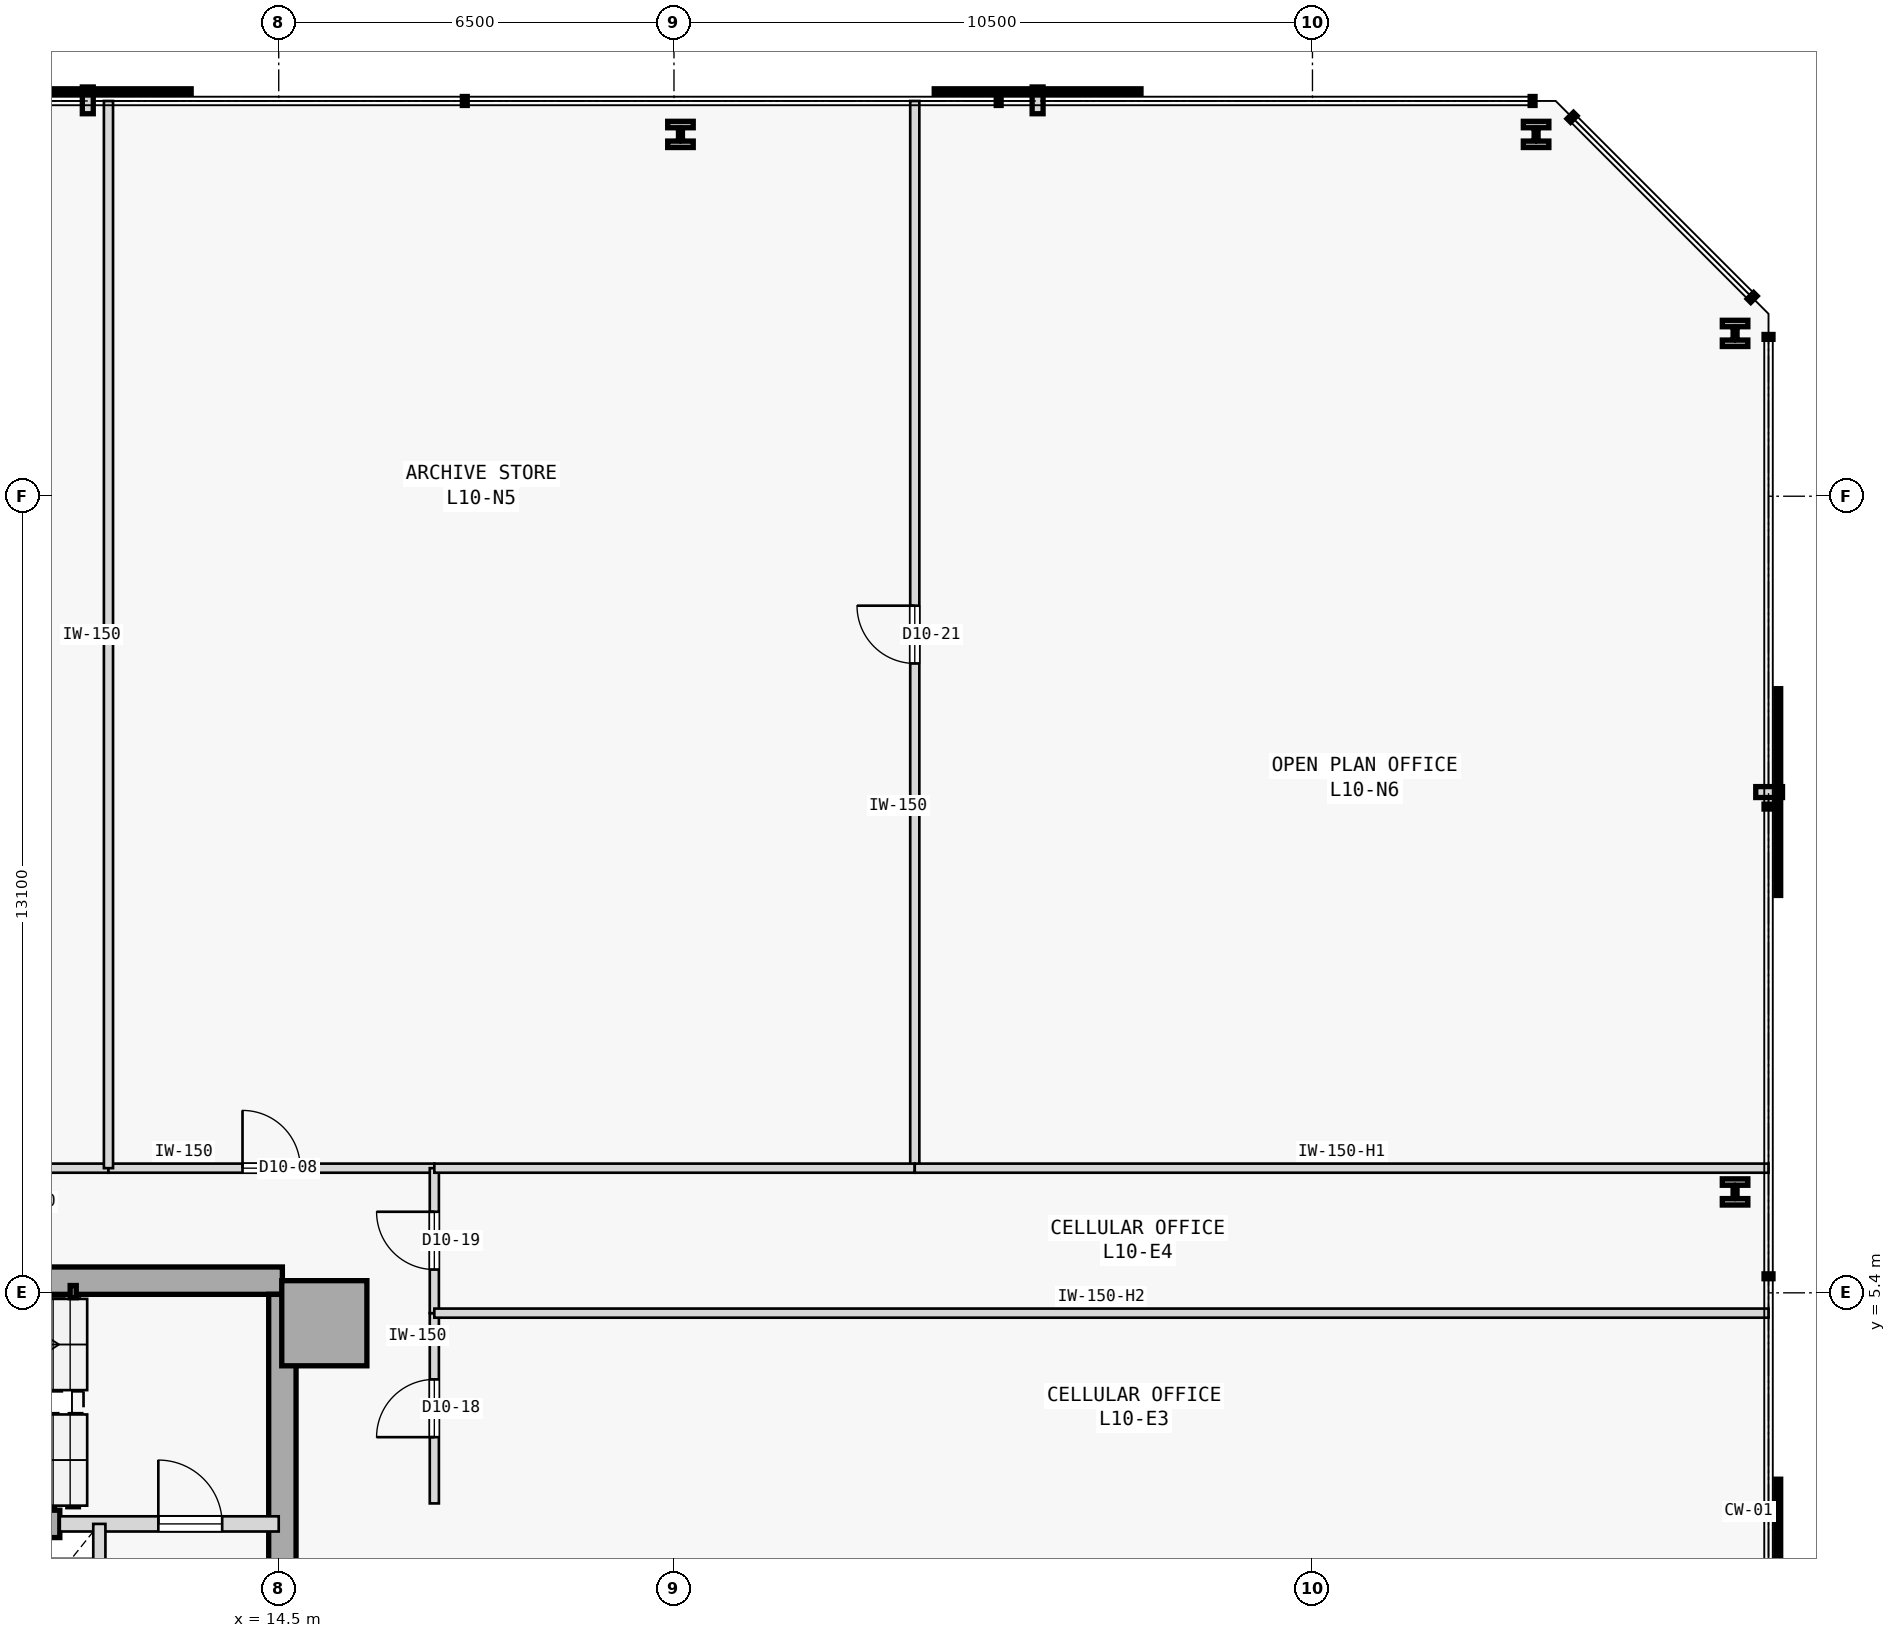
"""IFC4 building model, lengths in metres.
Left out: names, types, materials, properties, quantities, classifications, styles, units other than length and angle.
Written with IfcOpenShell. Run it as: python <this file> out.ifc"""

import sys

from ifc_helpers import new_model, si_unit, direction, frame, frame_2d, origin, origin_2d, place, context, subcontext, project, spatial, rectangle, hollow_rectangle, i_section, extrude, element, fill, save


model = new_model("IFC4")
c1 = context("Model", 3, precision=1e-05, world=origin(), true_north=direction((0.0, 1.0)))
c2 = subcontext(c1, "Body", "Model", "MODEL_VIEW")
j1 = project(units=[si_unit("LENGTHUNIT", "METRE"), si_unit("PLANEANGLEUNIT", "RADIAN")], contexts=[c1])
p1 = place(None, origin())
s1 = spatial("IfcSite", under=j1, at=p1, CompositionType="ELEMENT")
p2 = place(p1, origin())
s2 = spatial("IfcBuilding", under=s1, at=p2, CompositionType="ELEMENT")
p3 = place(p2, frame((0.0, 0.0, 44.6)))
s3 = spatial("IfcBuildingStorey", under=s2, at=p3, CompositionType="ELEMENT", Elevation=44.6)
p4 = place(p3, frame((15.25, 4.9, 0.0), z_axis=(0.0, 0.0, 1.0), x_axis=(1.0, 0.0, 0.0)))
e1 = element("IfcColumn", 1, at=p4, inside=s3, PredefinedType="COLUMN", context=c2, shape_type="SweptSolid", body=[
    extrude(rectangle(XDim=1.4, YDim=1.4, at=origin_2d()), origin(), (0.0, 0.0, 1.0), 3.8),
])
p5 = place(p3, frame((3.15, 5.6, 0.0), z_axis=(0.0, 0.0, 1.0), x_axis=(1.0, 0.0, 0.0)))
e2 = element("IfcWall", 2, at=p5, inside=s3, PredefinedType="SHEAR", context=c2, shape_type="SweptSolid", body=[
    extrude(rectangle(XDim=11.41, YDim=0.45, at=frame_2d((5.705, 0.0))), origin(), (0.0, 0.0, 1.0), 3.575),
])
p6 = place(p3, frame((14.56, -5.375, 0.0), z_axis=(0.0, 0.0, 1.0), x_axis=(0.0, 1.0, 0.0)))
e3 = element("IfcWall", 3, at=p6, inside=s3, PredefinedType="SHEAR", context=c2, shape_type="SweptSolid", body=[
    extrude(rectangle(XDim=10.75, YDim=0.45, at=frame_2d((5.375, 0.0))), origin(), (0.0, 0.0, 1.0), 3.575),
])
p7 = place(p3, frame((5.75, 1.6, 0.0), z_axis=(0.0, 0.0, 1.0), x_axis=(1.0, 0.0, 0.0)))
e4 = element("IfcWall", 4, at=p7, inside=s3, PredefinedType="SHEAR", context=c2, shape_type="SweptSolid", body=[
    extrude(rectangle(XDim=5.15, YDim=0.45, at=frame_2d((2.575, 0.0))), origin(), (0.0, 0.0, 1.0), 3.575),
])
p8 = place(p3, frame((11.12, 5.42, 0.0), z_axis=(0.0, 0.0, 1.0), x_axis=(1.0, 0.0, 0.0)))
e5 = element("IfcColumn", 5, at=p8, inside=s3, PredefinedType="COLUMN", context=c2, shape_type="SweptSolid", body=[
    extrude(hollow_rectangle(XDim=0.1, YDim=0.2, WallThickness=0.008, at=origin_2d()), origin(), (0.0, 0.0, 1.0), 3.8),
])
for number, where, z_axis, x_axis in (
    (6, (38.45, 7.059, 0.0), (0.0, 0.0, 1.0), (1.0, 0.0, 0.0)),
    (7, (38.45, 21.178, 0.0), (0.0, 0.0, 1.0), (1.0, 0.0, 0.0)),
    (8, (35.178, 24.45, 0.0), (0.0, 0.0, 1.0), (1.0, 0.0, 0.0)),
    (9, (21.107, 24.45, 0.0), (0.0, 0.0, 1.0), (1.0, 0.0, 0.0)),
):
    element("IfcColumn", number, at=place(p3, frame(where, z_axis=z_axis, x_axis=x_axis)), inside=s3, PredefinedType="COLUMN", context=c2, shape_type="SweptSolid", body=[
        extrude(i_section(OverallWidth=0.42, OverallDepth=0.431, WebThickness=0.065, FlangeThickness=0.106, FilletRadius=0.015, at=origin_2d()), origin(), (0.0, 0.0, 1.0), 3.8),
    ])
p9 = place(p3, frame((10.9, 1.6, 0.0), z_axis=(0.0, 0.0, 1.0), x_axis=(1.0, 0.0, 0.0)))
e10 = element("IfcWall", 10, at=p9, inside=s3, PredefinedType="STANDARD", context=c2, shape_type="SweptSolid", body=[
    extrude(rectangle(XDim=3.6, YDim=0.25, at=frame_2d((1.8, 0.0))), origin(), (0.0, 0.0, 1.0), 3.575),
])
p10 = place(p9, frame((1.62, 0.0, 0.0)))
e11 = element("IfcOpeningElement", 11, at=p10, cuts=e10, PredefinedType="OPENING", context=c2, shape_type="SweptSolid", body=[
    extrude(rectangle(XDim=1.05, YDim=2.15, at=frame_2d((0.525, 1.075))), frame((0.0, 0.135, 0.0), z_axis=(0.0, -1.0, 0.0), x_axis=(1.0, 0.0, 0.0)), (0.0, 0.0, 1.0), 0.27),
])
p11 = place(p3, frame((11.55, -1.15, 0.0), z_axis=(0.0, 0.0, 1.0), x_axis=(0.0, 1.0, 0.0)))
e12 = element("IfcWall", 12, at=p11, inside=s3, PredefinedType="STANDARD", context=c2, shape_type="SweptSolid", body=[
    extrude(rectangle(XDim=2.75, YDim=0.2, at=frame_2d((1.375, 0.0))), origin(), (0.0, 0.0, 1.0), 3.575),
])
p12 = place(p11, frame((0.825, 0.0, 0.0)))
e13 = element("IfcOpeningElement", 13, at=p12, cuts=e12, PredefinedType="OPENING", context=c2, shape_type="SweptSolid", body=[
    extrude(rectangle(XDim=1.1, YDim=2.15, at=frame_2d((0.55, 1.075))), frame((0.0, 0.11, 0.0), z_axis=(0.0, -1.0, 0.0), x_axis=(1.0, 0.0, 0.0)), (0.0, 0.0, 1.0), 0.22),
])
p13 = place(p3, frame((0.92, 7.45, 0.0), z_axis=(0.0, 0.0, 1.0), x_axis=(1.0, 0.0, 0.0)))
e14 = element("IfcWall", 14, at=p13, inside=s3, PredefinedType="PARTITIONING", context=c2, shape_type="SweptSolid", body=[
    extrude(rectangle(XDim=10.78, YDim=0.15, at=frame_2d((5.39, 0.0))), origin(), (0.0, 0.0, 1.0), 3.575),
])
p14 = place(p3, frame((11.7, 7.45, 0.0), z_axis=(0.0, 0.0, 1.0), x_axis=(1.0, 0.0, 0.0)))
e15 = element("IfcWall", 15, at=p14, inside=s3, PredefinedType="PARTITIONING", context=c2, shape_type="SweptSolid", body=[
    extrude(rectangle(XDim=5.359, YDim=0.15, at=frame_2d((2.68, 0.0))), origin(), (0.0, 0.0, 1.0), 3.575),
])
p15 = place(p14, frame((2.205, 0.0, 0.0)))
e16 = element("IfcOpeningElement", 16, at=p15, cuts=e15, PredefinedType="OPENING", context=c2, shape_type="SweptSolid", body=[
    extrude(rectangle(XDim=0.95, YDim=2.15, at=frame_2d((0.475, 1.075))), frame((0.0, 0.085, 0.0), z_axis=(0.0, -1.0, 0.0), x_axis=(1.0, 0.0, 0.0)), (0.0, 0.0, 1.0), 0.17),
])
p16 = place(p3, frame((17.059, 1.937, 0.0), z_axis=(0.0, 0.0, 1.0), x_axis=(0.0, 1.0, 0.0)))
e17 = element("IfcWall", 17, at=p16, inside=s3, PredefinedType="PARTITIONING", context=c2, shape_type="SweptSolid", body=[
    extrude(rectangle(XDim=3.129, YDim=0.15, at=frame_2d((1.564, 0.0))), origin(), (0.0, 0.0, 1.0), 3.575),
])
p17 = place(p16, frame((1.09, 0.0, 0.0)))
e18 = element("IfcOpeningElement", 18, at=p17, cuts=e17, PredefinedType="OPENING", context=c2, shape_type="SweptSolid", body=[
    extrude(rectangle(XDim=0.95, YDim=2.15, at=frame_2d((0.475, 1.075))), frame((0.0, 0.085, 0.0), z_axis=(0.0, -1.0, 0.0), x_axis=(1.0, 0.0, 0.0)), (0.0, 0.0, 1.0), 0.17),
])
p18 = place(p3, frame((17.059, 5.066, 0.0), z_axis=(0.0, 0.0, 1.0), x_axis=(0.0, 1.0, 0.0)))
e19 = element("IfcWall", 19, at=p18, inside=s3, PredefinedType="PARTITIONING", context=c2, shape_type="SweptSolid", body=[
    extrude(rectangle(XDim=2.384, YDim=0.15, at=frame_2d((1.192, 0.0))), origin(), (0.0, 0.0, 1.0), 3.575),
])
p19 = place(p18, frame((0.717, 0.0, 0.0)))
e20 = element("IfcOpeningElement", 20, at=p19, cuts=e19, PredefinedType="OPENING", context=c2, shape_type="SweptSolid", body=[
    extrude(rectangle(XDim=0.95, YDim=2.15, at=frame_2d((0.475, 1.075))), frame((0.0, 0.085, 0.0), z_axis=(0.0, -1.0, 0.0), x_axis=(1.0, 0.0, 0.0)), (0.0, 0.0, 1.0), 0.17),
])
p20 = place(p3, frame((11.7, 7.45, 0.0), z_axis=(0.0, 0.0, 1.0), x_axis=(0.0, 1.0, 0.0)))
e21 = element("IfcWall", 21, at=p20, inside=s3, PredefinedType="PARTITIONING", context=c2, shape_type="SweptSolid", body=[
    extrude(rectangle(XDim=17.55, YDim=0.15, at=frame_2d((8.775, 0.0))), origin(), (0.0, 0.0, 1.0), 3.575),
])
p21 = place(p3, frame((24.96, 7.45, 0.0), z_axis=(0.0, 0.0, 1.0), x_axis=(0.0, 1.0, 0.0)))
e22 = element("IfcWall", 22, at=p21, inside=s3, PredefinedType="PARTITIONING", context=c2, shape_type="SweptSolid", body=[
    extrude(rectangle(XDim=17.55, YDim=0.15, at=frame_2d((8.775, 0.0))), origin(), (0.0, 0.0, 1.0), 3.575),
])
p22 = place(p21, frame((8.3, 0.0, 0.0)))
e23 = element("IfcOpeningElement", 23, at=p22, cuts=e22, PredefinedType="OPENING", context=c2, shape_type="SweptSolid", body=[
    extrude(rectangle(XDim=0.95, YDim=2.15, at=frame_2d((0.475, 1.075))), frame((0.0, 0.085, 0.0), z_axis=(0.0, -1.0, 0.0), x_axis=(1.0, 0.0, 0.0)), (0.0, 0.0, 1.0), 0.17),
])
p23 = place(p3, frame((17.059, 7.45, 0.0), z_axis=(0.0, 0.0, 1.0), x_axis=(1.0, 0.0, 0.0)))
e24 = element("IfcWall", 24, at=p23, inside=s3, PredefinedType="PARTITIONING", context=c2, shape_type="SweptSolid", body=[
    extrude(rectangle(XDim=7.901, YDim=0.15, at=frame_2d((3.95, 0.0))), origin(), (0.0, 0.0, 1.0), 3.575),
])
p24 = place(p3, frame((24.96, 7.45, 0.0), z_axis=(0.0, 0.0, 1.0), x_axis=(1.0, 0.0, 0.0)))
e25 = element("IfcWall", 25, at=p24, inside=s3, PredefinedType="PARTITIONING", context=c2, shape_type="SweptSolid", body=[
    extrude(rectangle(XDim=14.04, YDim=0.15, at=frame_2d((7.02, 0.0))), origin(), (0.0, 0.0, 1.0), 3.125),
])
p25 = place(p3, frame((17.059, 5.066, 0.0), z_axis=(0.0, 0.0, 1.0), x_axis=(1.0, 0.0, 0.0)))
e26 = element("IfcWall", 26, at=p25, inside=s3, PredefinedType="PARTITIONING", context=c2, shape_type="SweptSolid", body=[
    extrude(rectangle(XDim=21.941, YDim=0.15, at=frame_2d((10.97, 0.0))), origin(), (0.0, 0.0, 1.0), 2.975),
])
p26 = place(p10, origin())
e27 = element("IfcDoor", 27, at=p26, inside=s3, OperationType="SINGLE_SWING_LEFT", PredefinedType="DOOR", context=c2, shape_type="SweptSolid", body=[
    extrude(rectangle(XDim=1.05, YDim=2.15, at=frame_2d((0.525, 1.075))), frame((0.0, 0.025, 0.0), z_axis=(0.0, -1.0, 0.0), x_axis=(1.0, 0.0, 0.0)), (0.0, 0.0, 1.0), 0.05),
])
fill(e11, e27)
p27 = place(p15, origin())
e28 = element("IfcDoor", 28, at=p27, inside=s3, OperationType="SINGLE_SWING_LEFT", PredefinedType="DOOR", context=c2, shape_type="SweptSolid", body=[
    extrude(rectangle(XDim=0.95, YDim=2.15, at=frame_2d((0.475, 1.075))), frame((0.0, 0.025, 0.0), z_axis=(0.0, -1.0, 0.0), x_axis=(1.0, 0.0, 0.0)), (0.0, 0.0, 1.0), 0.05),
])
fill(e16, e28)
p28 = place(p17, origin())
e29 = element("IfcDoor", 29, at=p28, inside=s3, OperationType="SINGLE_SWING_LEFT", PredefinedType="DOOR", context=c2, shape_type="SweptSolid", body=[
    extrude(rectangle(XDim=0.95, YDim=2.15, at=frame_2d((0.475, 1.075))), frame((0.0, 0.025, 0.0), z_axis=(0.0, -1.0, 0.0), x_axis=(1.0, 0.0, 0.0)), (0.0, 0.0, 1.0), 0.05),
])
fill(e18, e29)
p29 = place(p19, origin())
e30 = element("IfcDoor", 30, at=p29, inside=s3, OperationType="SINGLE_SWING_RIGHT", PredefinedType="DOOR", context=c2, shape_type="SweptSolid", body=[
    extrude(rectangle(XDim=0.95, YDim=2.15, at=frame_2d((0.475, 1.075))), frame((0.0, 0.025, 0.0), z_axis=(0.0, -1.0, 0.0), x_axis=(1.0, 0.0, 0.0)), (0.0, 0.0, 1.0), 0.05),
])
fill(e20, e30)
p30 = place(p22, origin())
e31 = element("IfcDoor", 31, at=p30, inside=s3, OperationType="SINGLE_SWING_RIGHT", PredefinedType="DOOR", context=c2, shape_type="SweptSolid", body=[
    extrude(rectangle(XDim=0.95, YDim=2.15, at=frame_2d((0.475, 1.075))), frame((0.0, 0.025, 0.0), z_axis=(0.0, -1.0, 0.0), x_axis=(1.0, 0.0, 0.0)), (0.0, 0.0, 1.0), 0.05),
])
fill(e23, e31)
save(model, sys.argv[1])
